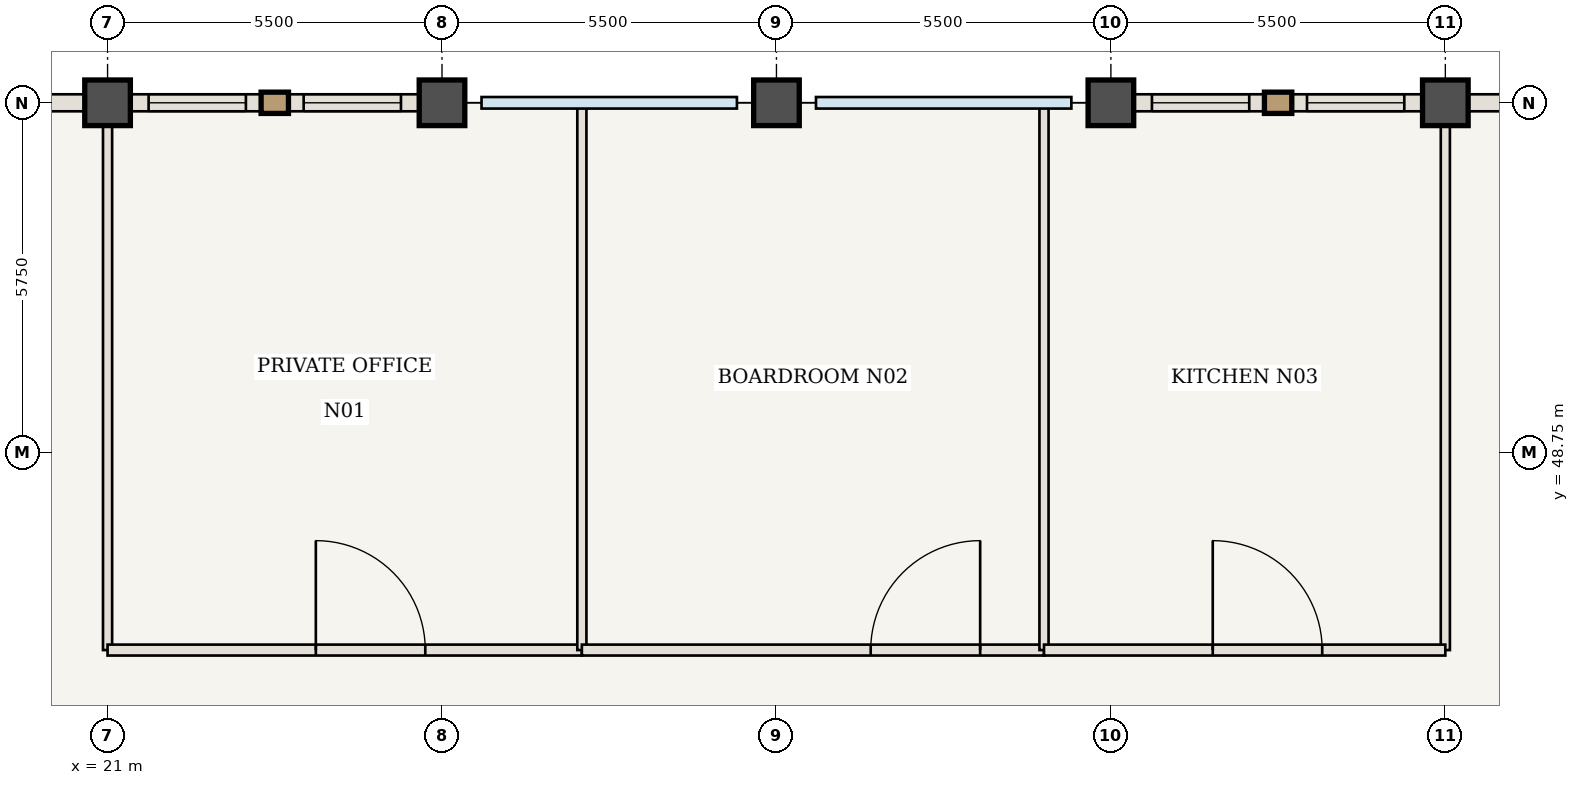
"""IFC4 building model, lengths in metres.
Left out: names, types, materials, properties, quantities, classifications, styles, units other than length and angle.
Written with IfcOpenShell. Run it as: python <this file> out.ifc"""

import sys

from ifc_helpers import new_model, si_unit, direction, frame, frame_2d, origin, origin_2d, place, context, subcontext, project, spatial, rectangle, extrude, element, fill, save


model = new_model("IFC4")
c1 = context("Model", 3, precision=1e-05, world=origin(), true_north=direction((0.0, 1.0)))
c2 = subcontext(c1, "Body", "Model", "MODEL_VIEW")
j1 = project(units=[si_unit("LENGTHUNIT", "METRE"), si_unit("PLANEANGLEUNIT", "RADIAN")], contexts=[c1])
p1 = place(None, origin())
s1 = spatial("IfcSite", under=j1, at=p1, CompositionType="ELEMENT")
p2 = place(p1, origin())
s2 = spatial("IfcBuilding", under=s1, at=p2, CompositionType="ELEMENT")
p3 = place(p2, frame((0.0, 0.0, 308.35)))
s3 = spatial("IfcBuildingStorey", under=s2, at=p3, CompositionType="ELEMENT", Elevation=308.35)
for number, where, z_axis, x_axis in (
    (1, (21.0, 54.5, 0.0), (0.0, 0.0, 1.0), (1.0, 0.0, 0.0)),
    (2, (26.5, 54.5, 0.0), (0.0, 0.0, 1.0), (1.0, 0.0, 0.0)),
    (3, (32.0, 54.5, 0.0), (0.0, 0.0, 1.0), (1.0, 0.0, 0.0)),
    (4, (37.5, 54.5, 0.0), (0.0, 0.0, 1.0), (1.0, 0.0, 0.0)),
    (5, (43.0, 54.5, 0.0), (0.0, 0.0, 1.0), (1.0, 0.0, 0.0)),
):
    element("IfcColumn", number, at=place(p3, frame(where, z_axis=z_axis, x_axis=x_axis)), inside=s3, PredefinedType="COLUMN", context=c2, shape_type="SweptSolid", body=[
        extrude(rectangle(XDim=0.75, YDim=0.75, at=origin_2d()), origin(), (0.0, 0.0, 1.0), 4.9),
    ])
for number, where, z_axis, x_axis in (
    (6, (21.0, 45.5, 0.0), (0.0, 0.0, 1.0), (0.0, 1.0, 0.0)),
    (7, (43.0, 45.5, 0.0), (0.0, 0.0, 1.0), (0.0, 1.0, 0.0)),
):
    element("IfcWall", number, at=place(p3, frame(where, z_axis=z_axis, x_axis=x_axis)), inside=s3, PredefinedType="STANDARD", context=c2, shape_type="SweptSolid", body=[
        extrude(rectangle(XDim=8.94, YDim=0.15, at=frame_2d((4.47, 0.0))), origin(), (0.0, 0.0, 1.0), 4.64),
    ])
p4 = place(p3, frame((21.0, 45.5, 0.0), z_axis=(0.0, 0.0, 1.0), x_axis=(1.0, 0.0, 0.0)))
e8 = element("IfcWall", 8, at=p4, inside=s3, PredefinedType="STANDARD", context=c2, shape_type="SweptSolid", body=[
    extrude(rectangle(XDim=7.8, YDim=0.18, at=frame_2d((3.9, 0.0))), origin(), (0.0, 0.0, 1.0), 4.64),
])
p5 = place(p4, frame((3.425, 0.0, 0.0)))
e9 = element("IfcOpeningElement", 9, at=p5, cuts=e8, PredefinedType="OPENING", context=c2, shape_type="SweptSolid", body=[
    extrude(rectangle(XDim=1.8, YDim=2.35, at=frame_2d((0.9, 1.175))), frame((0.0, 0.1, 0.0), z_axis=(0.0, -1.0, 0.0), x_axis=(1.0, 0.0, 0.0)), (0.0, 0.0, 1.0), 0.2),
])
p6 = place(p3, frame((28.8, 45.5, 0.0), z_axis=(0.0, 0.0, 1.0), x_axis=(0.0, 1.0, 0.0)))
e10 = element("IfcWall", 10, at=p6, inside=s3, PredefinedType="STANDARD", context=c2, shape_type="SweptSolid", body=[
    extrude(rectangle(XDim=8.94, YDim=0.15, at=frame_2d((4.47, 0.0))), origin(), (0.0, 0.0, 1.0), 4.64),
])
p7 = place(p3, frame((28.8, 45.5, 0.0), z_axis=(0.0, 0.0, 1.0), x_axis=(1.0, 0.0, 0.0)))
e11 = element("IfcWall", 11, at=p7, inside=s3, PredefinedType="STANDARD", context=c2, shape_type="SweptSolid", body=[
    extrude(rectangle(XDim=7.6, YDim=0.18, at=frame_2d((3.8, 0.0))), origin(), (0.0, 0.0, 1.0), 4.64),
])
p8 = place(p7, frame((4.75, 0.0, 0.0)))
e12 = element("IfcOpeningElement", 12, at=p8, cuts=e11, PredefinedType="OPENING", context=c2, shape_type="SweptSolid", body=[
    extrude(rectangle(XDim=1.8, YDim=2.35, at=frame_2d((0.9, 1.175))), frame((0.0, 0.1, 0.0), z_axis=(0.0, -1.0, 0.0), x_axis=(1.0, 0.0, 0.0)), (0.0, 0.0, 1.0), 0.2),
])
p9 = place(p3, frame((36.4, 45.5, 0.0), z_axis=(0.0, 0.0, 1.0), x_axis=(0.0, 1.0, 0.0)))
e13 = element("IfcWall", 13, at=p9, inside=s3, PredefinedType="STANDARD", context=c2, shape_type="SweptSolid", body=[
    extrude(rectangle(XDim=8.94, YDim=0.15, at=frame_2d((4.47, 0.0))), origin(), (0.0, 0.0, 1.0), 4.64),
])
p10 = place(p3, frame((36.4, 45.5, 0.0), z_axis=(0.0, 0.0, 1.0), x_axis=(1.0, 0.0, 0.0)))
e14 = element("IfcWall", 14, at=p10, inside=s3, PredefinedType="STANDARD", context=c2, shape_type="SweptSolid", body=[
    extrude(rectangle(XDim=6.6, YDim=0.18, at=frame_2d((3.3, 0.0))), origin(), (0.0, 0.0, 1.0), 4.64),
])
p11 = place(p10, frame((2.775, 0.0, 0.0)))
e15 = element("IfcOpeningElement", 15, at=p11, cuts=e14, PredefinedType="OPENING", context=c2, shape_type="SweptSolid", body=[
    extrude(rectangle(XDim=1.8, YDim=2.35, at=frame_2d((0.9, 1.175))), frame((0.0, 0.1, 0.0), z_axis=(0.0, -1.0, 0.0), x_axis=(1.0, 0.0, 0.0)), (0.0, 0.0, 1.0), 0.2),
])
p12 = place(p3, frame((15.5, 54.5, 0.0), z_axis=(0.0, 0.0, 1.0), x_axis=(1.0, 0.0, 0.0)))
e16 = element("IfcWall", 16, at=p12, inside=s3, PredefinedType="USERDEFINED", context=c2, shape_type="SweptSolid", body=[
    extrude(rectangle(XDim=5.5, YDim=0.28, at=frame_2d((2.75, 0.0))), origin(), (0.0, 0.0, 1.0), 3.94),
])
p13 = place(p3, frame((21.0, 54.5, 0.0), z_axis=(0.0, 0.0, 1.0), x_axis=(1.0, 0.0, 0.0)))
e17 = element("IfcWall", 17, at=p13, inside=s3, PredefinedType="USERDEFINED", context=c2, shape_type="SweptSolid", body=[
    extrude(rectangle(XDim=5.5, YDim=0.28, at=frame_2d((2.75, 0.0))), origin(), (0.0, 0.0, 1.0), 3.94),
])
p14 = place(p13, frame((0.675, 0.0, 0.85)))
e18 = element("IfcOpeningElement", 18, at=p14, cuts=e17, PredefinedType="OPENING", context=c2, shape_type="SweptSolid", body=[
    extrude(rectangle(XDim=1.6, YDim=2.15, at=frame_2d((0.8, 1.075))), frame((0.0, 0.15, 0.0), z_axis=(0.0, -1.0, 0.0), x_axis=(1.0, 0.0, 0.0)), (0.0, 0.0, 1.0), 0.3),
])
p15 = place(p13, frame((3.225, 0.0, 0.85)))
e19 = element("IfcOpeningElement", 19, at=p15, cuts=e17, PredefinedType="OPENING", context=c2, shape_type="SweptSolid", body=[
    extrude(rectangle(XDim=1.6, YDim=2.15, at=frame_2d((0.8, 1.075))), frame((0.0, 0.15, 0.0), z_axis=(0.0, -1.0, 0.0), x_axis=(1.0, 0.0, 0.0)), (0.0, 0.0, 1.0), 0.3),
])
p16 = place(p3, frame((37.5, 54.5, 0.0), z_axis=(0.0, 0.0, 1.0), x_axis=(1.0, 0.0, 0.0)))
e20 = element("IfcWall", 20, at=p16, inside=s3, PredefinedType="USERDEFINED", context=c2, shape_type="SweptSolid", body=[
    extrude(rectangle(XDim=5.5, YDim=0.28, at=frame_2d((2.75, 0.0))), origin(), (0.0, 0.0, 1.0), 3.94),
])
p17 = place(p16, frame((0.675, 0.0, 0.85)))
e21 = element("IfcOpeningElement", 21, at=p17, cuts=e20, PredefinedType="OPENING", context=c2, shape_type="SweptSolid", body=[
    extrude(rectangle(XDim=1.6, YDim=2.15, at=frame_2d((0.8, 1.075))), frame((0.0, 0.15, 0.0), z_axis=(0.0, -1.0, 0.0), x_axis=(1.0, 0.0, 0.0)), (0.0, 0.0, 1.0), 0.3),
])
p18 = place(p16, frame((3.225, 0.0, 0.85)))
e22 = element("IfcOpeningElement", 22, at=p18, cuts=e20, PredefinedType="OPENING", context=c2, shape_type="SweptSolid", body=[
    extrude(rectangle(XDim=1.6, YDim=2.15, at=frame_2d((0.8, 1.075))), frame((0.0, 0.15, 0.0), z_axis=(0.0, -1.0, 0.0), x_axis=(1.0, 0.0, 0.0)), (0.0, 0.0, 1.0), 0.3),
])
p19 = place(p3, frame((43.0, 54.5, 0.0), z_axis=(0.0, 0.0, 1.0), x_axis=(1.0, 0.0, 0.0)))
e23 = element("IfcWall", 23, at=p19, inside=s3, PredefinedType="USERDEFINED", context=c2, shape_type="SweptSolid", body=[
    extrude(rectangle(XDim=5.5, YDim=0.28, at=frame_2d((2.75, 0.0))), origin(), (0.0, 0.0, 1.0), 3.94),
])
p20 = place(p5, origin())
e24 = element("IfcDoor", 24, at=p20, inside=s3, OperationType="SINGLE_SWING_LEFT", PredefinedType="DOOR", context=c2, shape_type="SweptSolid", body=[
    extrude(rectangle(XDim=1.8, YDim=2.35, at=frame_2d((0.9, 1.175))), frame((0.0, 0.025, 0.0), z_axis=(0.0, -1.0, 0.0), x_axis=(1.0, 0.0, 0.0)), (0.0, 0.0, 1.0), 0.05),
])
fill(e9, e24)
p21 = place(p8, origin())
e25 = element("IfcDoor", 25, at=p21, inside=s3, OperationType="SINGLE_SWING_RIGHT", PredefinedType="DOOR", context=c2, shape_type="SweptSolid", body=[
    extrude(rectangle(XDim=1.8, YDim=2.35, at=frame_2d((0.9, 1.175))), frame((0.0, 0.025, 0.0), z_axis=(0.0, -1.0, 0.0), x_axis=(1.0, 0.0, 0.0)), (0.0, 0.0, 1.0), 0.05),
])
fill(e12, e25)
p22 = place(p11, origin())
e26 = element("IfcDoor", 26, at=p22, inside=s3, OperationType="SINGLE_SWING_LEFT", PredefinedType="DOOR", context=c2, shape_type="SweptSolid", body=[
    extrude(rectangle(XDim=1.8, YDim=2.35, at=frame_2d((0.9, 1.175))), frame((0.0, 0.025, 0.0), z_axis=(0.0, -1.0, 0.0), x_axis=(1.0, 0.0, 0.0)), (0.0, 0.0, 1.0), 0.05),
])
fill(e15, e26)
p23 = place(p14, origin())
e27 = element("IfcWindow", 27, at=p23, inside=s3, PartitioningType="SINGLE_PANEL", PredefinedType="WINDOW", context=c2, shape_type="SweptSolid", body=[
    extrude(rectangle(XDim=1.6, YDim=2.15, at=frame_2d((0.8, 1.075))), frame((0.0, 0.03, 0.0), z_axis=(0.0, -1.0, 0.0), x_axis=(1.0, 0.0, 0.0)), (0.0, 0.0, 1.0), 0.06),
])
fill(e18, e27)
p24 = place(p15, origin())
e28 = element("IfcWindow", 28, at=p24, inside=s3, PartitioningType="SINGLE_PANEL", PredefinedType="WINDOW", context=c2, shape_type="SweptSolid", body=[
    extrude(rectangle(XDim=1.6, YDim=2.15, at=frame_2d((0.8, 1.075))), frame((0.0, 0.03, 0.0), z_axis=(0.0, -1.0, 0.0), x_axis=(1.0, 0.0, 0.0)), (0.0, 0.0, 1.0), 0.06),
])
fill(e19, e28)
p25 = place(p17, origin())
e29 = element("IfcWindow", 29, at=p25, inside=s3, PartitioningType="SINGLE_PANEL", PredefinedType="WINDOW", context=c2, shape_type="SweptSolid", body=[
    extrude(rectangle(XDim=1.6, YDim=2.15, at=frame_2d((0.8, 1.075))), frame((0.0, 0.03, 0.0), z_axis=(0.0, -1.0, 0.0), x_axis=(1.0, 0.0, 0.0)), (0.0, 0.0, 1.0), 0.06),
])
fill(e21, e29)
p26 = place(p18, origin())
e30 = element("IfcWindow", 30, at=p26, inside=s3, PartitioningType="SINGLE_PANEL", PredefinedType="WINDOW", context=c2, shape_type="SweptSolid", body=[
    extrude(rectangle(XDim=1.6, YDim=2.15, at=frame_2d((0.8, 1.075))), frame((0.0, 0.03, 0.0), z_axis=(0.0, -1.0, 0.0), x_axis=(1.0, 0.0, 0.0)), (0.0, 0.0, 1.0), 0.06),
])
fill(e22, e30)
save(model, sys.argv[1])
